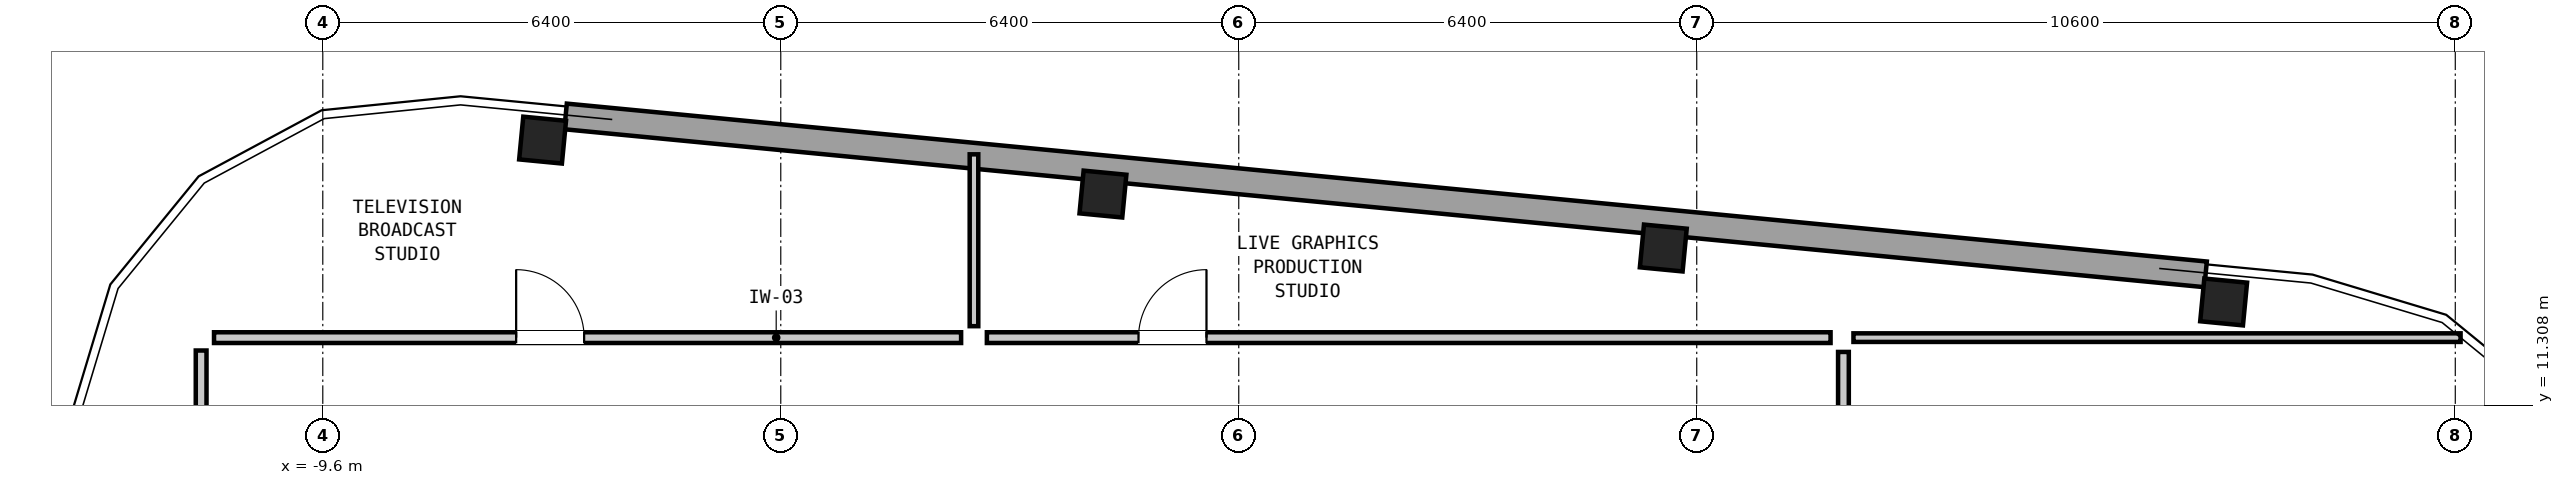
"""IFC4 building model, lengths in metres.
Left out: names, types, materials, properties, quantities, classifications, styles, units other than length and angle.
Written with IfcOpenShell. Run it as: python <this file> out.ifc"""

import sys

from ifc_helpers import new_model, si_unit, direction, frame, frame_2d, origin, origin_2d, place, context, subcontext, project, spatial, rectangle, hollow_rectangle, extrude, element, fill, save


model = new_model("IFC4")
c1 = context("Model", 3, precision=1e-05, world=origin(), true_north=direction((0.0, 1.0)))
c2 = subcontext(c1, "Body", "Model", "MODEL_VIEW")
j1 = project(units=[si_unit("LENGTHUNIT", "METRE"), si_unit("PLANEANGLEUNIT", "RADIAN")], contexts=[c1])
p1 = place(None, origin())
s1 = spatial("IfcSite", under=j1, at=p1, CompositionType="ELEMENT")
p2 = place(p1, origin())
s2 = spatial("IfcBuilding", under=s1, at=p2, CompositionType="ELEMENT")
p3 = place(p2, frame((0.0, 0.0, 242.85)))
s3 = spatial("IfcBuildingStorey", under=s2, at=p3, CompositionType="ELEMENT", Elevation=242.85)
for number, where, z_axis, x_axis in (
    (1, (16.963, 12.749, 0.0), (0.0, 0.0, 1.0), (0.995, -0.096, 0.0)),
    (2, (9.133, 13.502, 0.0), (0.0, 0.0, 1.0), (0.995, -0.096, 0.0)),
    (3, (1.302, 14.256, 0.0), (0.0, 0.0, 1.0), (0.995, -0.096, 0.0)),
    (4, (-6.528, 15.01, 0.0), (0.0, 0.0, 1.0), (0.995, -0.096, 0.0)),
):
    element("IfcColumn", number, at=place(p3, frame(where, z_axis=z_axis, x_axis=x_axis)), inside=s3, PredefinedType="COLUMN", context=c2, shape_type="SweptSolid", body=[
        extrude(hollow_rectangle(XDim=0.6, YDim=0.6, WallThickness=0.04, at=origin_2d()), origin(), (0.0, 0.0, 1.0), 3.05),
    ])
p4 = place(p3, frame((-6.207, 15.341, 0.0), z_axis=(0.0, 0.0, 1.0), x_axis=(0.995396042099, -0.095847375411, 0.0)))
e5 = element("IfcWall", 5, at=p4, inside=s3, PredefinedType="SOLIDWALL", context=c2, shape_type="SweptSolid", body=[
    extrude(rectangle(XDim=23.024, YDim=0.36, at=frame_2d((11.512, 0.0))), origin(), (0.0, 0.0, 1.0), 0.48),
])
p5 = place(p3, frame((11.79, 12.25, 0.0), z_axis=(0.0, 0.0, 1.0), x_axis=(1.0, 0.0, 0.0)))
e6 = element("IfcWall", 6, at=p5, inside=s3, PredefinedType="PARTITIONING", context=c2, shape_type="SweptSolid", body=[
    extrude(rectangle(XDim=8.484, YDim=0.12, at=frame_2d((4.242, 0.0))), origin(), (0.0, 0.0, 1.0), 2.86),
])
p6 = place(p3, frame((-0.5, 12.41, 0.0), z_axis=(0.0, 0.0, 1.0), x_axis=(0.0, 1.0, 0.0)))
e7 = element("IfcWall", 7, at=p6, inside=s3, PredefinedType="PARTITIONING", context=c2, shape_type="SweptSolid", body=[
    extrude(rectangle(XDim=2.402, YDim=0.12, at=frame_2d((1.201, 0.0))), origin(), (0.0, 0.0, 1.0), 2.381),
])
p7 = place(p3, frame((-11.12, 12.25, 0.0), z_axis=(0.0, 0.0, 1.0), x_axis=(1.0, 0.0, 0.0)))
e8 = element("IfcWall", 8, at=p7, inside=s3, PredefinedType="PARTITIONING", context=c2, shape_type="SweptSolid", body=[
    extrude(rectangle(XDim=10.44, YDim=0.15, at=frame_2d((5.22, 0.0))), origin(), (0.0, 0.0, 1.0), 2.86),
])
p8 = place(p7, frame((4.222, 0.0, 0.0)))
e9 = element("IfcOpeningElement", 9, at=p8, cuts=e8, PredefinedType="OPENING", context=c2, shape_type="SweptSolid", body=[
    extrude(rectangle(XDim=0.95, YDim=2.1, at=frame_2d((0.475, 1.05))), frame((0.0, 0.087, 0.0), z_axis=(0.0, -1.0, 0.0), x_axis=(1.0, 0.0, 0.0)), (0.0, 0.0, 1.0), 0.174),
])
p9 = place(p3, frame((-0.32, 12.25, 0.0), z_axis=(0.0, 0.0, 1.0), x_axis=(1.0, 0.0, 0.0)))
e10 = element("IfcWall", 10, at=p9, inside=s3, PredefinedType="PARTITIONING", context=c2, shape_type="SweptSolid", body=[
    extrude(rectangle(XDim=11.79, YDim=0.15, at=frame_2d((5.895, 0.0))), origin(), (0.0, 0.0, 1.0), 2.86),
])
p10 = place(p9, frame((2.119, 0.0, 0.0)))
e11 = element("IfcOpeningElement", 11, at=p10, cuts=e10, PredefinedType="OPENING", context=c2, shape_type="SweptSolid", body=[
    extrude(rectangle(XDim=0.95, YDim=2.1, at=frame_2d((0.475, 1.05))), frame((0.0, 0.087, 0.0), z_axis=(0.0, -1.0, 0.0), x_axis=(1.0, 0.0, 0.0)), (0.0, 0.0, 1.0), 0.174),
])
p11 = place(p3, frame((-11.3, 12.07, 0.0), z_axis=(0.0, 0.0, 1.0), x_axis=(0.0, -1.0, 0.0)))
e12 = element("IfcWall", 12, at=p11, inside=s3, PredefinedType="PARTITIONING", context=c2, shape_type="SweptSolid", body=[
    extrude(rectangle(XDim=22.94, YDim=0.15, at=frame_2d((11.47, 0.0))), origin(), (0.0, 0.0, 1.0), 2.86),
])
p12 = place(p11, frame((19.253, 0.0, 0.0)))
e13 = element("IfcOpeningElement", 13, at=p12, cuts=e12, PredefinedType="OPENING", context=c2, shape_type="SweptSolid", body=[
    extrude(rectangle(XDim=0.95, YDim=2.1, at=frame_2d((0.475, 1.05))), frame((0.0, 0.087, 0.0), z_axis=(0.0, -1.0, 0.0), x_axis=(1.0, 0.0, 0.0)), (0.0, 0.0, 1.0), 0.174),
])
p13 = place(p3, frame((11.65, 3.8, 0.0), z_axis=(0.0, 0.0, 1.0), x_axis=(0.0, 1.0, 0.0)))
e14 = element("IfcWall", 14, at=p13, inside=s3, PredefinedType="PARTITIONING", context=c2, shape_type="SweptSolid", body=[
    extrude(rectangle(XDim=8.25, YDim=0.15, at=frame_2d((4.125, 0.0))), origin(), (0.0, 0.0, 1.0), 2.86),
])
p14 = place(p13, frame((3.65, 0.0, 0.0)))
e15 = element("IfcOpeningElement", 15, at=p14, cuts=e14, PredefinedType="OPENING", context=c2, shape_type="SweptSolid", body=[
    extrude(rectangle(XDim=0.95, YDim=2.1, at=frame_2d((0.475, 1.05))), frame((0.0, 0.087, 0.0), z_axis=(0.0, -1.0, 0.0), x_axis=(1.0, 0.0, 0.0)), (0.0, 0.0, 1.0), 0.174),
])
p15 = place(p8, origin())
e16 = element("IfcDoor", 16, at=p15, inside=s3, OperationType="SINGLE_SWING_LEFT", PredefinedType="DOOR", context=c2, shape_type="SweptSolid", body=[
    extrude(rectangle(XDim=0.95, YDim=2.1, at=frame_2d((0.475, 1.05))), frame((0.0, 0.025, 0.0), z_axis=(0.0, -1.0, 0.0), x_axis=(1.0, 0.0, 0.0)), (0.0, 0.0, 1.0), 0.05),
])
fill(e9, e16)
p16 = place(p10, origin())
e17 = element("IfcDoor", 17, at=p16, inside=s3, OperationType="SINGLE_SWING_RIGHT", PredefinedType="DOOR", context=c2, shape_type="SweptSolid", body=[
    extrude(rectangle(XDim=0.95, YDim=2.1, at=frame_2d((0.475, 1.05))), frame((0.0, 0.025, 0.0), z_axis=(0.0, -1.0, 0.0), x_axis=(1.0, 0.0, 0.0)), (0.0, 0.0, 1.0), 0.05),
])
fill(e11, e17)
save(model, sys.argv[1])
